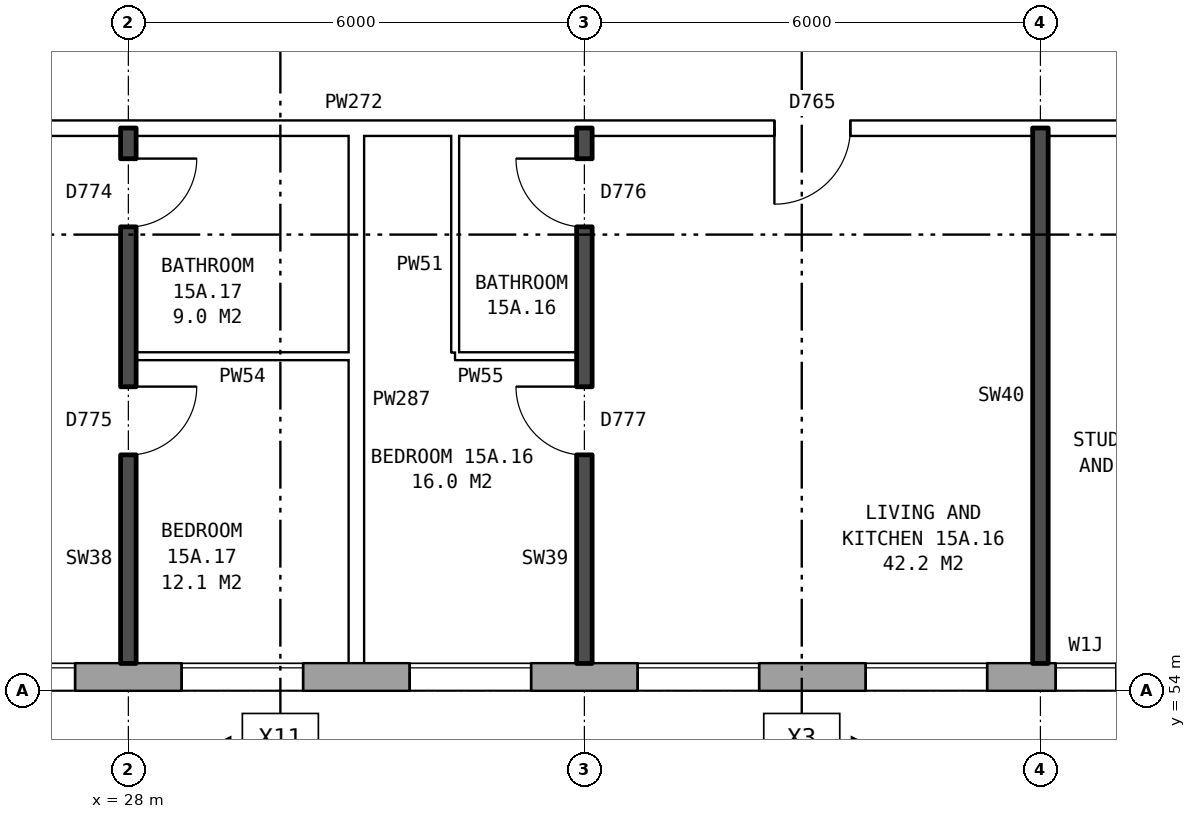
"""IFC4 building model, lengths in metres.
Left out: names, types, materials, properties, quantities, classifications, styles, units other than length and angle.
Written with IfcOpenShell. Run it as: python <this file> out.ifc"""

import sys

from ifc_helpers import new_model, si_unit, direction, frame, frame_2d, origin, place, context, subcontext, project, spatial, rectangle, extrude, element, fill, save


model = new_model("IFC4")
c1 = context("Model", 3, precision=1e-05, world=origin(), true_north=direction((0.0, 1.0)))
c2 = subcontext(c1, "Body", "Model", "MODEL_VIEW")
j1 = project(units=[si_unit("LENGTHUNIT", "METRE"), si_unit("PLANEANGLEUNIT", "RADIAN")], contexts=[c1])
p1 = place(None, origin())
s1 = spatial("IfcSite", under=j1, at=p1, CompositionType="ELEMENT")
p2 = place(p1, origin())
s2 = spatial("IfcBuilding", under=s1, at=p2, CompositionType="ELEMENT")
p3 = place(p2, frame((0.0, 0.0, 56.7)))
s3 = spatial("IfcBuildingStorey", under=s2, at=p3, CompositionType="ELEMENT", Elevation=56.7)
p4 = place(p3, frame((24.575, 54.18, 0.0), z_axis=(0.0, 0.0, 1.0), x_axis=(1.0, 0.0, 0.0)))
e1 = element("IfcWall", 1, at=p4, inside=s3, PredefinedType="STANDARD", context=c2, shape_type="SweptSolid", body=[
    extrude(rectangle(XDim=48.351, YDim=0.36, at=frame_2d((24.175, 0.0))), origin(), (0.0, 0.0, 1.0), 2.85),
])
p5 = place(p4, frame((1.125, 0.0, 0.8)))
e2 = element("IfcOpeningElement", 2, at=p5, cuts=e1, PredefinedType="OPENING", context=c2, shape_type="SweptSolid", body=[
    extrude(rectangle(XDim=1.6, YDim=1.8, at=frame_2d((0.8, 0.9))), frame((0.0, 0.19, 0.0), z_axis=(0.0, -1.0, 0.0), x_axis=(1.0, 0.0, 0.0)), (0.0, 0.0, 1.0), 0.38),
])
p6 = place(p4, frame((4.125, 0.0, 0.8)))
e3 = element("IfcOpeningElement", 3, at=p6, cuts=e1, PredefinedType="OPENING", context=c2, shape_type="SweptSolid", body=[
    extrude(rectangle(XDim=1.6, YDim=1.8, at=frame_2d((0.8, 0.9))), frame((0.0, 0.19, 0.0), z_axis=(0.0, -1.0, 0.0), x_axis=(1.0, 0.0, 0.0)), (0.0, 0.0, 1.0), 0.38),
])
p7 = place(p4, frame((7.125, 0.0, 0.8)))
e4 = element("IfcOpeningElement", 4, at=p7, cuts=e1, PredefinedType="OPENING", context=c2, shape_type="SweptSolid", body=[
    extrude(rectangle(XDim=1.6, YDim=1.8, at=frame_2d((0.8, 0.9))), frame((0.0, 0.19, 0.0), z_axis=(0.0, -1.0, 0.0), x_axis=(1.0, 0.0, 0.0)), (0.0, 0.0, 1.0), 0.38),
])
p8 = place(p4, frame((10.125, 0.0, 0.8)))
e5 = element("IfcOpeningElement", 5, at=p8, cuts=e1, PredefinedType="OPENING", context=c2, shape_type="SweptSolid", body=[
    extrude(rectangle(XDim=1.6, YDim=1.8, at=frame_2d((0.8, 0.9))), frame((0.0, 0.19, 0.0), z_axis=(0.0, -1.0, 0.0), x_axis=(1.0, 0.0, 0.0)), (0.0, 0.0, 1.0), 0.38),
])
p9 = place(p4, frame((13.125, 0.0, 0.8)))
e6 = element("IfcOpeningElement", 6, at=p9, cuts=e1, PredefinedType="OPENING", context=c2, shape_type="SweptSolid", body=[
    extrude(rectangle(XDim=1.6, YDim=1.8, at=frame_2d((0.8, 0.9))), frame((0.0, 0.19, 0.0), z_axis=(0.0, -1.0, 0.0), x_axis=(1.0, 0.0, 0.0)), (0.0, 0.0, 1.0), 0.38),
])
p10 = place(p4, frame((15.625, 0.0, 1.0)))
e7 = element("IfcOpeningElement", 7, at=p10, cuts=e1, PredefinedType="OPENING", context=c2, shape_type="SweptSolid", body=[
    extrude(rectangle(XDim=0.8, YDim=1.5, at=frame_2d((0.4, 0.75))), frame((0.0, 0.19, 0.0), z_axis=(0.0, -1.0, 0.0), x_axis=(1.0, 0.0, 0.0)), (0.0, 0.0, 1.0), 0.38),
])
p11 = place(p4, frame((16.725, 0.0, 1.6)))
e8 = element("IfcOpeningElement", 8, at=p11, cuts=e1, PredefinedType="OPENING", context=c2, shape_type="SweptSolid", body=[
    extrude(rectangle(XDim=0.6, YDim=0.9, at=frame_2d((0.3, 0.45))), frame((0.0, 0.19, 0.0), z_axis=(0.0, -1.0, 0.0), x_axis=(1.0, 0.0, 0.0)), (0.0, 0.0, 1.0), 0.38),
])
p12 = place(p4, frame((22.125, 0.0, 0.8)))
e9 = element("IfcOpeningElement", 9, at=p12, cuts=e1, PredefinedType="OPENING", context=c2, shape_type="SweptSolid", body=[
    extrude(rectangle(XDim=1.6, YDim=1.8, at=frame_2d((0.8, 0.9))), frame((0.0, 0.19, 0.0), z_axis=(0.0, -1.0, 0.0), x_axis=(1.0, 0.0, 0.0)), (0.0, 0.0, 1.0), 0.38),
])
p13 = place(p4, frame((25.125, 0.0, 0.8)))
e10 = element("IfcOpeningElement", 10, at=p13, cuts=e1, PredefinedType="OPENING", context=c2, shape_type="SweptSolid", body=[
    extrude(rectangle(XDim=1.6, YDim=1.8, at=frame_2d((0.8, 0.9))), frame((0.0, 0.19, 0.0), z_axis=(0.0, -1.0, 0.0), x_axis=(1.0, 0.0, 0.0)), (0.0, 0.0, 1.0), 0.38),
])
p14 = place(p4, frame((27.625, 0.0, 0.35)))
e11 = element("IfcOpeningElement", 11, at=p14, cuts=e1, PredefinedType="OPENING", context=c2, shape_type="SweptSolid", body=[
    extrude(rectangle(XDim=1.2, YDim=1.8, at=frame_2d((0.6, 0.9))), frame((0.0, 0.19, 0.0), z_axis=(0.0, -1.0, 0.0), x_axis=(1.0, 0.0, 0.0)), (0.0, 0.0, 1.0), 0.38),
])
p15 = place(p4, frame((30.875, 0.0, 1.7)))
e12 = element("IfcOpeningElement", 12, at=p15, cuts=e1, PredefinedType="OPENING", context=c2, shape_type="SweptSolid", body=[
    extrude(rectangle(XDim=1.0, YDim=0.9, at=frame_2d((0.5, 0.45))), frame((0.0, 0.19, 0.0), z_axis=(0.0, -1.0, 0.0), x_axis=(1.0, 0.0, 0.0)), (0.0, 0.0, 1.0), 0.38),
])
p16 = place(p4, frame((34.125, 0.0, 0.8)))
e13 = element("IfcOpeningElement", 13, at=p16, cuts=e1, PredefinedType="OPENING", context=c2, shape_type="SweptSolid", body=[
    extrude(rectangle(XDim=1.6, YDim=1.8, at=frame_2d((0.8, 0.9))), frame((0.0, 0.19, 0.0), z_axis=(0.0, -1.0, 0.0), x_axis=(1.0, 0.0, 0.0)), (0.0, 0.0, 1.0), 0.38),
])
p17 = place(p4, frame((37.125, 0.0, 0.8)))
e14 = element("IfcOpeningElement", 14, at=p17, cuts=e1, PredefinedType="OPENING", context=c2, shape_type="SweptSolid", body=[
    extrude(rectangle(XDim=1.6, YDim=1.8, at=frame_2d((0.8, 0.9))), frame((0.0, 0.19, 0.0), z_axis=(0.0, -1.0, 0.0), x_axis=(1.0, 0.0, 0.0)), (0.0, 0.0, 1.0), 0.38),
])
p18 = place(p4, frame((40.125, 0.0, 0.8)))
e15 = element("IfcOpeningElement", 15, at=p18, cuts=e1, PredefinedType="OPENING", context=c2, shape_type="SweptSolid", body=[
    extrude(rectangle(XDim=1.6, YDim=1.8, at=frame_2d((0.8, 0.9))), frame((0.0, 0.19, 0.0), z_axis=(0.0, -1.0, 0.0), x_axis=(1.0, 0.0, 0.0)), (0.0, 0.0, 1.0), 0.38),
])
p19 = place(p4, frame((43.125, 0.0, 0.8)))
e16 = element("IfcOpeningElement", 16, at=p19, cuts=e1, PredefinedType="OPENING", context=c2, shape_type="SweptSolid", body=[
    extrude(rectangle(XDim=1.6, YDim=1.8, at=frame_2d((0.8, 0.9))), frame((0.0, 0.19, 0.0), z_axis=(0.0, -1.0, 0.0), x_axis=(1.0, 0.0, 0.0)), (0.0, 0.0, 1.0), 0.38),
])
p20 = place(p4, frame((46.125, 0.0, 0.8)))
e17 = element("IfcOpeningElement", 17, at=p20, cuts=e1, PredefinedType="OPENING", context=c2, shape_type="SweptSolid", body=[
    extrude(rectangle(XDim=1.6, YDim=1.8, at=frame_2d((0.8, 0.9))), frame((0.0, 0.19, 0.0), z_axis=(0.0, -1.0, 0.0), x_axis=(1.0, 0.0, 0.0)), (0.0, 0.0, 1.0), 0.38),
])
p21 = place(p4, frame((18.875, 0.0, 0.8)))
e18 = element("IfcOpeningElement", 18, at=p21, cuts=e1, PredefinedType="OPENING", context=c2, shape_type="SweptSolid", body=[
    extrude(rectangle(XDim=1.0, YDim=0.9, at=frame_2d((0.5, 0.45))), frame((0.0, 0.19, 0.0), z_axis=(0.0, -1.0, 0.0), x_axis=(1.0, 0.0, 0.0)), (0.0, 0.0, 1.0), 0.38),
])
p22 = place(p4, frame((20.175, 0.0, 0.8)))
e19 = element("IfcOpeningElement", 19, at=p22, cuts=e1, PredefinedType="OPENING", context=c2, shape_type="SweptSolid", body=[
    extrude(rectangle(XDim=1.0, YDim=1.8, at=frame_2d((0.5, 0.9))), frame((0.0, 0.19, 0.0), z_axis=(0.0, -1.0, 0.0), x_axis=(1.0, 0.0, 0.0)), (0.0, 0.0, 1.0), 0.38),
])
p23 = place(p4, frame((29.125, 0.0, 0.35)))
e20 = element("IfcOpeningElement", 20, at=p23, cuts=e1, PredefinedType="OPENING", context=c2, shape_type="SweptSolid", body=[
    extrude(rectangle(XDim=1.0, YDim=0.9, at=frame_2d((0.5, 0.45))), frame((0.0, 0.19, 0.0), z_axis=(0.0, -1.0, 0.0), x_axis=(1.0, 0.0, 0.0)), (0.0, 0.0, 1.0), 0.38),
])
p24 = place(p4, frame((32.225, 0.0, 0.8)))
e21 = element("IfcOpeningElement", 21, at=p24, cuts=e1, PredefinedType="OPENING", context=c2, shape_type="SweptSolid", body=[
    extrude(rectangle(XDim=1.0, YDim=1.8, at=frame_2d((0.5, 0.9))), frame((0.0, 0.19, 0.0), z_axis=(0.0, -1.0, 0.0), x_axis=(1.0, 0.0, 0.0)), (0.0, 0.0, 1.0), 0.38),
])
p25 = place(p3, frame((28.1, 58.4, 0.0), z_axis=(0.0, 0.0, 1.0), x_axis=(1.0, 0.0, 0.0)))
e22 = element("IfcWall", 22, at=p25, inside=s3, PredefinedType="PARTITIONING", context=c2, shape_type="SweptSolid", body=[
    extrude(rectangle(XDim=2.8, YDim=0.1, at=frame_2d((1.4, 0.0))), origin(), (0.0, 0.0, 1.0), 2.85),
])
p26 = place(p3, frame((32.3, 58.4, 0.0), z_axis=(0.0, 0.0, 1.0), x_axis=(1.0, 0.0, 0.0)))
e23 = element("IfcWall", 23, at=p26, inside=s3, PredefinedType="PARTITIONING", context=c2, shape_type="SweptSolid", body=[
    extrude(rectangle(XDim=1.6, YDim=0.1, at=frame_2d((0.8, 0.0))), origin(), (0.0, 0.0, 1.0), 2.85),
])
p27 = place(p3, frame((21.86, 61.4, 0.0), z_axis=(0.0, 0.0, 1.0), x_axis=(1.0, 0.0, 0.0)))
e24 = element("IfcWall", 24, at=p27, inside=s3, PredefinedType="PARTITIONING", context=c2, shape_type="SweptSolid", body=[
    extrude(rectangle(XDim=24.04, YDim=0.2, at=frame_2d((12.02, 0.0))), origin(), (0.0, 0.0, 1.0), 2.85),
])
p28 = place(p27, frame((19.44, 0.0, 0.0)))
e25 = element("IfcOpeningElement", 25, at=p28, cuts=e24, PredefinedType="OPENING", context=c2, shape_type="SweptSolid", body=[
    extrude(rectangle(XDim=1.0, YDim=2.1, at=frame_2d((0.5, 1.05))), frame((0.0, 0.11, 0.0), z_axis=(0.0, -1.0, 0.0), x_axis=(1.0, 0.0, 0.0)), (0.0, 0.0, 1.0), 0.22),
])
p29 = place(p27, frame((14.64, 0.0, 0.0)))
e26 = element("IfcOpeningElement", 26, at=p29, cuts=e24, PredefinedType="OPENING", context=c2, shape_type="SweptSolid", body=[
    extrude(rectangle(XDim=1.0, YDim=2.1, at=frame_2d((0.5, 1.05))), frame((0.0, 0.11, 0.0), z_axis=(0.0, -1.0, 0.0), x_axis=(1.0, 0.0, 0.0)), (0.0, 0.0, 1.0), 0.22),
])
p30 = place(p27, frame((2.57, 0.0, 0.0)))
e27 = element("IfcOpeningElement", 27, at=p30, cuts=e24, PredefinedType="OPENING", context=c2, shape_type="SweptSolid", body=[
    extrude(rectangle(XDim=1.0, YDim=2.1, at=frame_2d((0.5, 1.05))), frame((0.0, 0.11, 0.0), z_axis=(0.0, -1.0, 0.0), x_axis=(1.0, 0.0, 0.0)), (0.0, 0.0, 1.0), 0.22),
])
p31 = place(p3, frame((28.0, 54.36, 0.0), z_axis=(0.0, 0.0, 1.0), x_axis=(0.0, 1.0, 0.0)))
e28 = element("IfcWall", 28, at=p31, inside=s3, PredefinedType="SOLIDWALL", context=c2, shape_type="SweptSolid", body=[
    extrude(rectangle(XDim=7.04, YDim=0.2, at=frame_2d((3.52, 0.0))), origin(), (0.0, 0.0, 1.0), 2.85),
])
p32 = place(p31, frame((2.74, 0.0, 0.0)))
e29 = element("IfcOpeningElement", 29, at=p32, cuts=e28, PredefinedType="OPENING", context=c2, shape_type="SweptSolid", body=[
    extrude(rectangle(XDim=0.9, YDim=2.1, at=frame_2d((0.45, 1.05))), frame((0.0, 0.11, 0.0), z_axis=(0.0, -1.0, 0.0), x_axis=(1.0, 0.0, 0.0)), (0.0, 0.0, 1.0), 0.22),
])
p33 = place(p31, frame((5.74, 0.0, 0.0)))
e30 = element("IfcOpeningElement", 30, at=p33, cuts=e28, PredefinedType="OPENING", context=c2, shape_type="SweptSolid", body=[
    extrude(rectangle(XDim=0.9, YDim=2.1, at=frame_2d((0.45, 1.05))), frame((0.0, 0.11, 0.0), z_axis=(0.0, -1.0, 0.0), x_axis=(1.0, 0.0, 0.0)), (0.0, 0.0, 1.0), 0.22),
])
p34 = place(p3, frame((31.0, 54.36, 0.0), z_axis=(0.0, 0.0, 1.0), x_axis=(0.0, 1.0, 0.0)))
e31 = element("IfcWall", 31, at=p34, inside=s3, PredefinedType="PARTITIONING", context=c2, shape_type="SweptSolid", body=[
    extrude(rectangle(XDim=6.94, YDim=0.2, at=frame_2d((3.47, 0.0))), origin(), (0.0, 0.0, 1.0), 2.85),
])
p35 = place(p3, frame((32.3, 58.45, 0.0), z_axis=(0.0, 0.0, 1.0), x_axis=(0.0, 1.0, 0.0)))
e32 = element("IfcWall", 32, at=p35, inside=s3, PredefinedType="PARTITIONING", context=c2, shape_type="SweptSolid", body=[
    extrude(rectangle(XDim=2.85, YDim=0.1, at=frame_2d((1.425, 0.0))), origin(), (0.0, 0.0, 1.0), 2.85),
])
p36 = place(p3, frame((34.0, 54.36, 0.0), z_axis=(0.0, 0.0, 1.0), x_axis=(0.0, 1.0, 0.0)))
e33 = element("IfcWall", 33, at=p36, inside=s3, PredefinedType="SOLIDWALL", context=c2, shape_type="SweptSolid", body=[
    extrude(rectangle(XDim=7.04, YDim=0.2, at=frame_2d((3.52, 0.0))), origin(), (0.0, 0.0, 1.0), 2.85),
])
p37 = place(p36, frame((2.74, 0.0, 0.0)))
e34 = element("IfcOpeningElement", 34, at=p37, cuts=e33, PredefinedType="OPENING", context=c2, shape_type="SweptSolid", body=[
    extrude(rectangle(XDim=0.9, YDim=2.1, at=frame_2d((0.45, 1.05))), frame((0.0, 0.11, 0.0), z_axis=(0.0, -1.0, 0.0), x_axis=(1.0, 0.0, 0.0)), (0.0, 0.0, 1.0), 0.22),
])
p38 = place(p36, frame((5.74, 0.0, 0.0)))
e35 = element("IfcOpeningElement", 35, at=p38, cuts=e33, PredefinedType="OPENING", context=c2, shape_type="SweptSolid", body=[
    extrude(rectangle(XDim=0.9, YDim=2.1, at=frame_2d((0.45, 1.05))), frame((0.0, 0.11, 0.0), z_axis=(0.0, -1.0, 0.0), x_axis=(1.0, 0.0, 0.0)), (0.0, 0.0, 1.0), 0.22),
])
p39 = place(p3, frame((40.0, 54.36, 0.0), z_axis=(0.0, 0.0, 1.0), x_axis=(0.0, 1.0, 0.0)))
e36 = element("IfcWall", 36, at=p39, inside=s3, PredefinedType="SOLIDWALL", context=c2, shape_type="SweptSolid", body=[
    extrude(rectangle(XDim=7.04, YDim=0.2, at=frame_2d((3.52, 0.0))), origin(), (0.0, 0.0, 1.0), 2.85),
])
p40 = place(p5, origin())
e37 = element("IfcWindow", 37, at=p40, inside=s3, PartitioningType="SINGLE_PANEL", PredefinedType="WINDOW", context=c2, shape_type="SweptSolid", body=[
    extrude(rectangle(XDim=1.6, YDim=1.8, at=frame_2d((0.8, 0.9))), frame((0.0, 0.15, 0.0), z_axis=(0.0, -1.0, 0.0), x_axis=(1.0, 0.0, 0.0)), (0.0, 0.0, 1.0), 0.06),
])
fill(e2, e37)
p41 = place(p6, origin())
e38 = element("IfcWindow", 38, at=p41, inside=s3, PartitioningType="SINGLE_PANEL", PredefinedType="WINDOW", context=c2, shape_type="SweptSolid", body=[
    extrude(rectangle(XDim=1.6, YDim=1.8, at=frame_2d((0.8, 0.9))), frame((0.0, 0.15, 0.0), z_axis=(0.0, -1.0, 0.0), x_axis=(1.0, 0.0, 0.0)), (0.0, 0.0, 1.0), 0.06),
])
fill(e3, e38)
p42 = place(p7, origin())
e39 = element("IfcWindow", 39, at=p42, inside=s3, PartitioningType="SINGLE_PANEL", PredefinedType="WINDOW", context=c2, shape_type="SweptSolid", body=[
    extrude(rectangle(XDim=1.6, YDim=1.8, at=frame_2d((0.8, 0.9))), frame((0.0, 0.15, 0.0), z_axis=(0.0, -1.0, 0.0), x_axis=(1.0, 0.0, 0.0)), (0.0, 0.0, 1.0), 0.06),
])
fill(e4, e39)
p43 = place(p8, origin())
e40 = element("IfcWindow", 40, at=p43, inside=s3, PartitioningType="SINGLE_PANEL", PredefinedType="WINDOW", context=c2, shape_type="SweptSolid", body=[
    extrude(rectangle(XDim=1.6, YDim=1.8, at=frame_2d((0.8, 0.9))), frame((0.0, 0.15, 0.0), z_axis=(0.0, -1.0, 0.0), x_axis=(1.0, 0.0, 0.0)), (0.0, 0.0, 1.0), 0.06),
])
fill(e5, e40)
p44 = place(p9, origin())
e41 = element("IfcWindow", 41, at=p44, inside=s3, PartitioningType="SINGLE_PANEL", PredefinedType="WINDOW", context=c2, shape_type="SweptSolid", body=[
    extrude(rectangle(XDim=1.6, YDim=1.8, at=frame_2d((0.8, 0.9))), frame((0.0, 0.15, 0.0), z_axis=(0.0, -1.0, 0.0), x_axis=(1.0, 0.0, 0.0)), (0.0, 0.0, 1.0), 0.06),
])
fill(e6, e41)
p45 = place(p10, origin())
e42 = element("IfcWindow", 42, at=p45, inside=s3, PartitioningType="SINGLE_PANEL", PredefinedType="WINDOW", context=c2, shape_type="SweptSolid", body=[
    extrude(rectangle(XDim=0.8, YDim=1.5, at=frame_2d((0.4, 0.75))), frame((0.0, 0.15, 0.0), z_axis=(0.0, -1.0, 0.0), x_axis=(1.0, 0.0, 0.0)), (0.0, 0.0, 1.0), 0.06),
])
fill(e7, e42)
p46 = place(p37, origin())
e43 = element("IfcDoor", 43, at=p46, inside=s3, OperationType="SINGLE_SWING_RIGHT", PredefinedType="DOOR", context=c2, shape_type="SweptSolid", body=[
    extrude(rectangle(XDim=0.9, YDim=2.1, at=frame_2d((0.45, 1.05))), frame((0.0, 0.025, 0.0), z_axis=(0.0, -1.0, 0.0), x_axis=(1.0, 0.0, 0.0)), (0.0, 0.0, 1.0), 0.05),
])
fill(e34, e43)
p47 = place(p29, frame((1.0, 0.0, 0.0), z_axis=(0.0, 0.0, 1.0), x_axis=(-1.0, 0.0, 0.0)))
e44 = element("IfcDoor", 44, at=p47, inside=s3, OperationType="SINGLE_SWING_RIGHT", PredefinedType="DOOR", context=c2, shape_type="SweptSolid", body=[
    extrude(rectangle(XDim=1.0, YDim=2.1, at=frame_2d((0.5, 1.05))), frame((0.0, 0.025, 0.0), z_axis=(0.0, -1.0, 0.0), x_axis=(1.0, 0.0, 0.0)), (0.0, 0.0, 1.0), 0.05),
])
fill(e26, e44)
p48 = place(p38, origin())
e45 = element("IfcDoor", 45, at=p48, inside=s3, OperationType="SINGLE_SWING_RIGHT", PredefinedType="DOOR", context=c2, shape_type="SweptSolid", body=[
    extrude(rectangle(XDim=0.9, YDim=2.1, at=frame_2d((0.45, 1.05))), frame((0.0, 0.025, 0.0), z_axis=(0.0, -1.0, 0.0), x_axis=(1.0, 0.0, 0.0)), (0.0, 0.0, 1.0), 0.05),
])
fill(e35, e45)
p49 = place(p32, frame((0.9, 0.0, 0.0), z_axis=(0.0, 0.0, 1.0), x_axis=(-1.0, 0.0, 0.0)))
e46 = element("IfcDoor", 46, at=p49, inside=s3, OperationType="SINGLE_SWING_LEFT", PredefinedType="DOOR", context=c2, shape_type="SweptSolid", body=[
    extrude(rectangle(XDim=0.9, YDim=2.1, at=frame_2d((0.45, 1.05))), frame((0.0, 0.025, 0.0), z_axis=(0.0, -1.0, 0.0), x_axis=(1.0, 0.0, 0.0)), (0.0, 0.0, 1.0), 0.05),
])
fill(e29, e46)
p50 = place(p33, frame((0.9, 0.0, 0.0), z_axis=(0.0, 0.0, 1.0), x_axis=(-1.0, 0.0, 0.0)))
e47 = element("IfcDoor", 47, at=p50, inside=s3, OperationType="SINGLE_SWING_LEFT", PredefinedType="DOOR", context=c2, shape_type="SweptSolid", body=[
    extrude(rectangle(XDim=0.9, YDim=2.1, at=frame_2d((0.45, 1.05))), frame((0.0, 0.025, 0.0), z_axis=(0.0, -1.0, 0.0), x_axis=(1.0, 0.0, 0.0)), (0.0, 0.0, 1.0), 0.05),
])
fill(e30, e47)
save(model, sys.argv[1])
